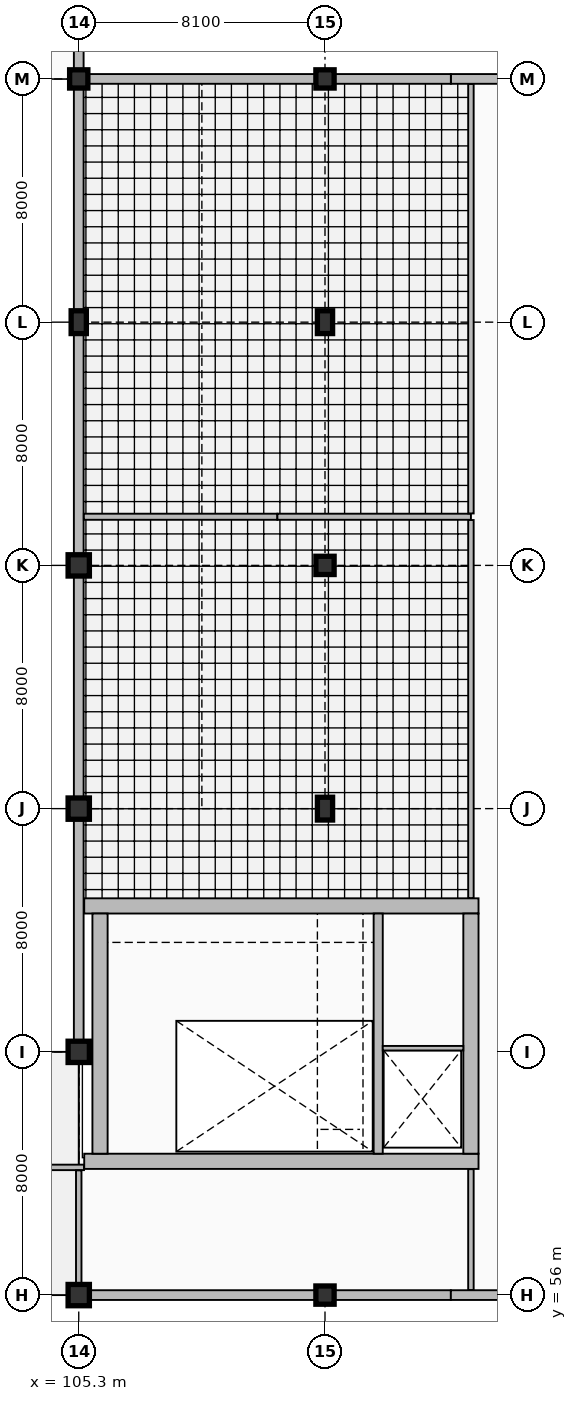
"""IFC4 building model, lengths in metres.
Left out: names, types, materials, properties, quantities, classifications, styles, units other than length and angle.
Written with IfcOpenShell. Run it as: python <this file> out.ifc"""

import sys

from ifc_helpers import new_model, si_unit, direction, frame, frame_2d, origin, origin_2d, place, context, subcontext, project, spatial, rectangle, extrude, element, fill, save


model = new_model("IFC4")
c1 = context("Model", 3, precision=1e-05, world=origin(), true_north=direction((0.0, 1.0)))
c2 = subcontext(c1, "Body", "Model", "MODEL_VIEW")
j1 = project(units=[si_unit("LENGTHUNIT", "METRE"), si_unit("PLANEANGLEUNIT", "RADIAN")], contexts=[c1])
p1 = place(None, origin())
s1 = spatial("IfcSite", under=j1, at=p1, CompositionType="ELEMENT")
p2 = place(p1, origin())
s2 = spatial("IfcBuilding", under=s1, at=p2, CompositionType="ELEMENT")
p3 = place(p2, frame((0.0, 0.0, 10.2)))
s3 = spatial("IfcBuildingStorey", under=s2, at=p3, CompositionType="ELEMENT", Elevation=10.2)
p4 = place(p3, frame((105.48, 60.4, 0.0), z_axis=(0.0, 0.0, 1.0), x_axis=(1.0, 0.0, 0.0)))
e1 = element("IfcWall", 1, at=p4, inside=s3, PredefinedType="SHEAR", context=c2, shape_type="SweptSolid", body=[
    extrude(rectangle(XDim=12.97, YDim=0.5, at=frame_2d((6.485, 0.0))), origin(), (0.0, 0.0, 1.0), 4.5),
])
p5 = place(p4, frame((1.27, 0.0, 0.0)))
e2 = element("IfcOpeningElement", 2, at=p5, cuts=e1, PredefinedType="OPENING", context=c2, shape_type="SweptSolid", body=[
    extrude(rectangle(XDim=1.15, YDim=2.25, at=frame_2d((0.575, 1.125))), frame((0.0, 0.26, 0.0), z_axis=(0.0, -1.0, 0.0), x_axis=(1.0, 0.0, 0.0)), (0.0, 0.0, 1.0), 0.52),
])
p6 = place(p4, frame((10.475, 0.0, 0.0)))
e3 = element("IfcOpeningElement", 3, at=p6, cuts=e1, PredefinedType="OPENING", context=c2, shape_type="SweptSolid", body=[
    extrude(rectangle(XDim=1.3, YDim=2.3, at=frame_2d((0.65, 1.15))), frame((0.0, 0.26, 0.0), z_axis=(0.0, -1.0, 0.0), x_axis=(1.0, 0.0, 0.0)), (0.0, 0.0, 1.0), 0.52),
])
p7 = place(p3, frame((105.48, 68.8, 0.0), z_axis=(0.0, 0.0, 1.0), x_axis=(1.0, 0.0, 0.0)))
e4 = element("IfcWall", 4, at=p7, inside=s3, PredefinedType="SHEAR", context=c2, shape_type="SweptSolid", body=[
    extrude(rectangle(XDim=12.97, YDim=0.5, at=frame_2d((6.485, 0.0))), origin(), (0.0, 0.0, 1.0), 4.5),
])
for number, where, z_axis, x_axis in (
    (5, (106.0, 60.65, 0.0), (0.0, 0.0, 1.0), (0.0, 1.0, 0.0)),
    (6, (118.2, 60.65, 0.0), (0.0, 0.0, 1.0), (0.0, 1.0, 0.0)),
):
    element("IfcWall", number, at=place(p3, frame(where, z_axis=z_axis, x_axis=x_axis)), inside=s3, PredefinedType="SHEAR", context=c2, shape_type="SweptSolid", body=[
        extrude(rectangle(XDim=7.9, YDim=0.5, at=frame_2d((3.95, 0.0))), origin(), (0.0, 0.0, 1.0), 4.5),
    ])
p8 = place(p3, frame((115.15, 60.65, 0.0), z_axis=(0.0, 0.0, 1.0), x_axis=(0.0, 1.0, 0.0)))
e7 = element("IfcWall", 7, at=p8, inside=s3, PredefinedType="SHEAR", context=c2, shape_type="SweptSolid", body=[
    extrude(rectangle(XDim=7.9, YDim=0.3, at=frame_2d((3.95, 0.0))), origin(), (0.0, 0.0, 1.0), 4.5),
])
for number, where, z_axis, x_axis in (
    (8, (105.3, 56.0, 0.0), (0.0, 0.0, 1.0), (1.0, 0.0, 0.0)),
    (9, (105.3, 64.0, 0.0), (0.0, 0.0, 1.0), (1.0, 0.0, 0.0)),
    (10, (105.3, 72.0, 0.0), (0.0, 0.0, 1.0), (1.0, 0.0, 0.0)),
    (11, (105.3, 80.0, 0.0), (0.0, 0.0, 1.0), (1.0, 0.0, 0.0)),
):
    element("IfcColumn", number, at=place(p3, frame(where, z_axis=z_axis, x_axis=x_axis)), inside=s3, PredefinedType="COLUMN", context=c2, shape_type="SweptSolid", body=[
        extrude(rectangle(XDim=0.7, YDim=0.7, at=origin_2d()), origin(), (0.0, 0.0, 1.0), 4.5),
    ])
p9 = place(p3, frame((105.3, 88.0, 0.0), z_axis=(0.0, 0.0, 1.0), x_axis=(1.0, 0.0, 0.0)))
e12 = element("IfcColumn", 12, at=p9, inside=s3, PredefinedType="COLUMN", context=c2, shape_type="SweptSolid", body=[
    extrude(rectangle(XDim=0.5, YDim=0.75, at=origin_2d()), origin(), (0.0, 0.0, 1.0), 4.5),
])
for number, where, z_axis, x_axis in (
    (13, (105.3, 96.0, 0.0), (0.0, 0.0, 1.0), (1.0, 0.0, 0.0)),
    (14, (113.4, 56.0, 0.0), (0.0, 0.0, 1.0), (1.0, 0.0, 0.0)),
):
    element("IfcColumn", number, at=place(p3, frame(where, z_axis=z_axis, x_axis=x_axis)), inside=s3, PredefinedType="COLUMN", context=c2, shape_type="SweptSolid", body=[
        extrude(rectangle(XDim=0.6, YDim=0.6, at=origin_2d()), origin(), (0.0, 0.0, 1.0), 4.5),
    ])
p10 = place(p3, frame((113.4, 72.0, 0.0), z_axis=(0.0, 0.0, 1.0), x_axis=(1.0, 0.0, 0.0)))
e15 = element("IfcColumn", 15, at=p10, inside=s3, PredefinedType="COLUMN", context=c2, shape_type="SweptSolid", body=[
    extrude(rectangle(XDim=0.5, YDim=0.75, at=origin_2d()), origin(), (0.0, 0.0, 1.0), 4.5),
])
p11 = place(p3, frame((113.4, 80.0, 0.0), z_axis=(0.0, 0.0, 1.0), x_axis=(1.0, 0.0, 0.0)))
e16 = element("IfcColumn", 16, at=p11, inside=s3, PredefinedType="COLUMN", context=c2, shape_type="SweptSolid", body=[
    extrude(rectangle(XDim=0.6, YDim=0.6, at=origin_2d()), origin(), (0.0, 0.0, 1.0), 4.5),
])
p12 = place(p3, frame((113.4, 88.0, 0.0), z_axis=(0.0, 0.0, 1.0), x_axis=(1.0, 0.0, 0.0)))
e17 = element("IfcColumn", 17, at=p12, inside=s3, PredefinedType="COLUMN", context=c2, shape_type="SweptSolid", body=[
    extrude(rectangle(XDim=0.5, YDim=0.75, at=origin_2d()), origin(), (0.0, 0.0, 1.0), 4.5),
])
p13 = place(p3, frame((113.4, 96.0, 0.0), z_axis=(0.0, 0.0, 1.0), x_axis=(1.0, 0.0, 0.0)))
e18 = element("IfcColumn", 18, at=p13, inside=s3, PredefinedType="COLUMN", context=c2, shape_type="SweptSolid", body=[
    extrude(rectangle(XDim=0.6, YDim=0.6, at=origin_2d()), origin(), (0.0, 0.0, 1.0), 4.5),
])
p14 = place(p3, frame((105.48, 56.0, 0.0), z_axis=(0.0, 0.0, 1.0), x_axis=(1.0, 0.0, 0.0)))
e19 = element("IfcWall", 19, at=p14, inside=s3, PredefinedType="SOLIDWALL", context=c2, shape_type="SweptSolid", body=[
    extrude(rectangle(XDim=12.06, YDim=0.32, at=frame_2d((6.03, 0.0))), origin(), (0.0, 0.0, 1.0), 3.544),
])
p15 = place(p14, frame((2.25, 0.0, 0.95)))
e20 = element("IfcOpeningElement", 20, at=p15, cuts=e19, PredefinedType="OPENING", context=c2, shape_type="SweptSolid", body=[
    extrude(rectangle(XDim=3.6, YDim=1.8, at=frame_2d((1.8, 0.9))), frame((0.0, 0.17, 0.0), z_axis=(0.0, -1.0, 0.0), x_axis=(1.0, 0.0, 0.0)), (0.0, 0.0, 1.0), 0.34),
])
p16 = place(p3, frame((117.54, 56.0, 0.0), z_axis=(0.0, 0.0, 1.0), x_axis=(1.0, 0.0, 0.0)))
e21 = element("IfcWall", 21, at=p16, inside=s3, PredefinedType="SOLIDWALL", context=c2, shape_type="SweptSolid", body=[
    extrude(rectangle(XDim=12.06, YDim=0.32, at=frame_2d((6.03, 0.0))), origin(), (0.0, 0.0, 1.0), 3.544),
])
p17 = place(p16, frame((3.6, 0.0, 0.95)))
e22 = element("IfcOpeningElement", 22, at=p17, cuts=e21, PredefinedType="OPENING", context=c2, shape_type="SweptSolid", body=[
    extrude(rectangle(XDim=0.6, YDim=1.8, at=frame_2d((0.3, 0.9))), frame((0.0, 0.17, 0.0), z_axis=(0.0, -1.0, 0.0), x_axis=(1.0, 0.0, 0.0)), (0.0, 0.0, 1.0), 0.34),
])
p18 = place(p3, frame((129.6, 96.0, 0.0), z_axis=(0.0, 0.0, 1.0), x_axis=(-1.0, 0.0, 0.0)))
e23 = element("IfcWall", 23, at=p18, inside=s3, PredefinedType="SOLIDWALL", context=c2, shape_type="SweptSolid", body=[
    extrude(rectangle(XDim=12.06, YDim=0.32, at=frame_2d((6.03, 0.0))), origin(), (0.0, 0.0, 1.0), 3.544),
])
p19 = place(p3, frame((117.54, 96.0, 0.0), z_axis=(0.0, 0.0, 1.0), x_axis=(-1.0, 0.0, 0.0)))
e24 = element("IfcWall", 24, at=p19, inside=s3, PredefinedType="SOLIDWALL", context=c2, shape_type="SweptSolid", body=[
    extrude(rectangle(XDim=12.06, YDim=0.32, at=frame_2d((6.03, 0.0))), origin(), (0.0, 0.0, 1.0), 3.544),
])
p20 = place(p19, frame((6.3, 0.0, 0.95)))
e25 = element("IfcOpeningElement", 25, at=p20, cuts=e24, PredefinedType="OPENING", context=c2, shape_type="SweptSolid", body=[
    extrude(rectangle(XDim=3.6, YDim=0.9, at=frame_2d((1.8, 0.45))), frame((0.0, 0.17, 0.0), z_axis=(0.0, -1.0, 0.0), x_axis=(1.0, 0.0, 0.0)), (0.0, 0.0, 1.0), 0.34),
])
p21 = place(p3, frame((105.3, 96.18, 0.0), z_axis=(0.0, 0.0, 1.0), x_axis=(0.0, 1.0, 0.0)))
e26 = element("IfcWall", 26, at=p21, inside=s3, PredefinedType="SOLIDWALL", context=c2, shape_type="SweptSolid", body=[
    extrude(rectangle(XDim=15.82, YDim=0.32, at=frame_2d((7.91, 0.0))), origin(), (0.0, 0.0, 1.0), 3.732),
])
p22 = place(p21, frame((9.45, 0.0, 0.95)))
e27 = element("IfcOpeningElement", 27, at=p22, cuts=e26, PredefinedType="OPENING", context=c2, shape_type="SweptSolid", body=[
    extrude(rectangle(XDim=1.6, YDim=1.4, at=frame_2d((0.8, 0.7))), frame((0.0, 0.17, 0.0), z_axis=(0.0, -1.0, 0.0), x_axis=(1.0, 0.0, 0.0)), (0.0, 0.0, 1.0), 0.34),
])
p23 = place(p3, frame((105.3, 95.82, 0.0), z_axis=(0.0, 0.0, 1.0), x_axis=(0.0, -1.0, 0.0)))
e28 = element("IfcWall", 28, at=p23, inside=s3, PredefinedType="SOLIDWALL", context=c2, shape_type="SweptSolid", body=[
    extrude(rectangle(XDim=15.82, YDim=0.32, at=frame_2d((7.91, 0.0))), origin(), (0.0, 0.0, 1.0), 3.769),
])
p24 = place(p3, frame((105.3, 80.0, 0.0), z_axis=(0.0, 0.0, 1.0), x_axis=(0.0, -1.0, 0.0)))
e29 = element("IfcWall", 29, at=p24, inside=s3, PredefinedType="SOLIDWALL", context=c2, shape_type="SweptSolid", body=[
    extrude(rectangle(XDim=15.82, YDim=0.32, at=frame_2d((7.91, 0.0))), origin(), (0.0, 0.0, 1.0), 3.732),
])
p25 = place(p24, frame((4.05, 0.0, 0.95)))
e30 = element("IfcOpeningElement", 30, at=p25, cuts=e29, PredefinedType="OPENING", context=c2, shape_type="SweptSolid", body=[
    extrude(rectangle(XDim=2.7, YDim=1.8, at=frame_2d((1.35, 0.9))), frame((0.0, 0.17, 0.0), z_axis=(0.0, -1.0, 0.0), x_axis=(1.0, 0.0, 0.0)), (0.0, 0.0, 1.0), 0.34),
])
p26 = place(p3, frame((115.3, 64.12, 0.0), z_axis=(0.0, 0.0, 1.0), x_axis=(1.0, 0.0, 0.0)))
e31 = element("IfcWall", 31, at=p26, inside=s3, PredefinedType="PARTITIONING", context=c2, shape_type="SweptSolid", body=[
    extrude(rectangle(XDim=2.65, YDim=0.15, at=frame_2d((1.325, 0.0))), origin(), (0.0, 0.0, 1.0), 4.24),
])
p27 = place(p3, frame((48.6, 60.2, 0.0), z_axis=(0.0, 0.0, 1.0), x_axis=(1.0, 0.0, 0.0)))
e32 = element("IfcWall", 32, at=p27, inside=s3, PredefinedType="PARTITIONING", context=c2, shape_type="SweptSolid", body=[
    extrude(rectangle(XDim=56.872, YDim=0.18, at=frame_2d((28.436, 0.0))), origin(), (0.0, 0.0, 1.0), 4.24),
])
p28 = place(p27, frame((27.886, 0.0, 0.0)))
e33 = element("IfcOpeningElement", 33, at=p28, cuts=e32, PredefinedType="OPENING", context=c2, shape_type="SweptSolid", body=[
    extrude(rectangle(XDim=1.1, YDim=2.2, at=frame_2d((0.55, 1.1))), frame((0.0, 0.1, 0.0), z_axis=(0.0, -1.0, 0.0), x_axis=(1.0, 0.0, 0.0)), (0.0, 0.0, 1.0), 0.2),
])
for number, where, z_axis, x_axis in (
    (34, (105.468, 81.6, 0.0), (0.0, 0.0, 1.0), (1.0, 0.0, 0.0)),
    (35, (111.834, 81.6, 0.0), (0.0, 0.0, 1.0), (1.0, 0.0, 0.0)),
):
    element("IfcWall", number, at=place(p3, frame(where, z_axis=z_axis, x_axis=x_axis)), inside=s3, PredefinedType="PARTITIONING", context=c2, shape_type="SweptSolid", body=[
        extrude(rectangle(XDim=6.366, YDim=0.2, at=frame_2d((3.183, 0.0))), origin(), (0.0, 0.0, 1.0), 4.24),
    ])
p29 = place(p3, frame((105.3, 56.358, 0.0), z_axis=(0.0, 0.0, 1.0), x_axis=(0.0, 1.0, 0.0)))
e36 = element("IfcWall", 36, at=p29, inside=s3, PredefinedType="PARTITIONING", context=c2, shape_type="SweptSolid", body=[
    extrude(rectangle(XDim=3.744, YDim=0.18, at=frame_2d((1.872, 0.0))), origin(), (0.0, 0.0, 1.0), 3.769),
])
p30 = place(p29, frame((1.372, 0.0, 0.0)))
e37 = element("IfcOpeningElement", 37, at=p30, cuts=e36, PredefinedType="OPENING", context=c2, shape_type="SweptSolid", body=[
    extrude(rectangle(XDim=1.6, YDim=2.35, at=frame_2d((0.8, 1.175))), frame((0.0, 0.1, 0.0), z_axis=(0.0, -1.0, 0.0), x_axis=(1.0, 0.0, 0.0)), (0.0, 0.0, 1.0), 0.2),
])
p31 = place(p3, frame((118.2, 56.168, 0.0), z_axis=(0.0, 0.0, 1.0), x_axis=(0.0, 1.0, 0.0)))
e38 = element("IfcWall", 38, at=p31, inside=s3, PredefinedType="PARTITIONING", context=c2, shape_type="SweptSolid", body=[
    extrude(rectangle(XDim=3.974, YDim=0.18, at=frame_2d((1.987, 0.0))), origin(), (0.0, 0.0, 1.0), 4.24),
])
p32 = place(p31, frame((1.387, 0.0, 0.0)))
e39 = element("IfcOpeningElement", 39, at=p32, cuts=e38, PredefinedType="OPENING", context=c2, shape_type="SweptSolid", body=[
    extrude(rectangle(XDim=1.2, YDim=2.2, at=frame_2d((0.6, 1.1))), frame((0.0, 0.1, 0.0), z_axis=(0.0, -1.0, 0.0), x_axis=(1.0, 0.0, 0.0)), (0.0, 0.0, 1.0), 0.2),
])
p33 = place(p3, frame((118.2, 69.058, 0.0), z_axis=(0.0, 0.0, 1.0), x_axis=(0.0, 1.0, 0.0)))
e40 = element("IfcWall", 40, at=p33, inside=s3, PredefinedType="PARTITIONING", context=c2, shape_type="SweptSolid", body=[
    extrude(rectangle(XDim=12.434, YDim=0.18, at=frame_2d((6.217, 0.0))), origin(), (0.0, 0.0, 1.0), 4.24),
])
p34 = place(p33, frame((5.667, 0.0, 0.0)))
e41 = element("IfcOpeningElement", 41, at=p34, cuts=e40, PredefinedType="OPENING", context=c2, shape_type="SweptSolid", body=[
    extrude(rectangle(XDim=1.1, YDim=2.2, at=frame_2d((0.55, 1.1))), frame((0.0, 0.1, 0.0), z_axis=(0.0, -1.0, 0.0), x_axis=(1.0, 0.0, 0.0)), (0.0, 0.0, 1.0), 0.2),
])
p35 = place(p3, frame((118.2, 81.708, 0.0), z_axis=(0.0, 0.0, 1.0), x_axis=(0.0, 1.0, 0.0)))
e42 = element("IfcWall", 42, at=p35, inside=s3, PredefinedType="PARTITIONING", context=c2, shape_type="SweptSolid", body=[
    extrude(rectangle(XDim=14.124, YDim=0.18, at=frame_2d((7.062, 0.0))), origin(), (0.0, 0.0, 1.0), 4.24),
])
p36 = place(p35, frame((6.512, 0.0, 0.0)))
e43 = element("IfcOpeningElement", 43, at=p36, cuts=e42, PredefinedType="OPENING", context=c2, shape_type="SweptSolid", body=[
    extrude(rectangle(XDim=1.1, YDim=2.2, at=frame_2d((0.55, 1.1))), frame((0.0, 0.1, 0.0), z_axis=(0.0, -1.0, 0.0), x_axis=(1.0, 0.0, 0.0)), (0.0, 0.0, 1.0), 0.2),
])
p37 = place(p15, origin())
e44 = element("IfcWindow", 44, at=p37, inside=s3, PartitioningType="TRIPLE_PANEL_VERTICAL", PredefinedType="WINDOW", context=c2, shape_type="SweptSolid", body=[
    extrude(rectangle(XDim=3.6, YDim=1.8, at=frame_2d((1.8, 0.9))), frame((0.0, 0.03, 0.0), z_axis=(0.0, -1.0, 0.0), x_axis=(1.0, 0.0, 0.0)), (0.0, 0.0, 1.0), 0.06),
])
fill(e20, e44)
p38 = place(p20, origin())
e45 = element("IfcWindow", 45, at=p38, inside=s3, PartitioningType="TRIPLE_PANEL_VERTICAL", PredefinedType="WINDOW", context=c2, shape_type="SweptSolid", body=[
    extrude(rectangle(XDim=3.6, YDim=0.9, at=frame_2d((1.8, 0.45))), frame((0.0, 0.03, 0.0), z_axis=(0.0, -1.0, 0.0), x_axis=(1.0, 0.0, 0.0)), (0.0, 0.0, 1.0), 0.06),
])
fill(e25, e45)
p39 = place(p25, origin())
e46 = element("IfcWindow", 46, at=p39, inside=s3, PartitioningType="TRIPLE_PANEL_VERTICAL", PredefinedType="WINDOW", context=c2, shape_type="SweptSolid", body=[
    extrude(rectangle(XDim=2.7, YDim=1.8, at=frame_2d((1.35, 0.9))), frame((0.0, 0.03, 0.0), z_axis=(0.0, -1.0, 0.0), x_axis=(1.0, 0.0, 0.0)), (0.0, 0.0, 1.0), 0.06),
])
fill(e30, e46)
p40 = place(p5, origin())
e47 = element("IfcDoor", 47, at=p40, inside=s3, OperationType="SINGLE_SWING_RIGHT", PredefinedType="DOOR", context=c2, shape_type="SweptSolid", body=[
    extrude(rectangle(XDim=1.15, YDim=2.25, at=frame_2d((0.575, 1.125))), frame((0.0, 0.025, 0.0), z_axis=(0.0, -1.0, 0.0), x_axis=(1.0, 0.0, 0.0)), (0.0, 0.0, 1.0), 0.05),
])
fill(e2, e47)
p41 = place(p6, frame((1.3, 0.0, 0.0), z_axis=(0.0, 0.0, 1.0), x_axis=(-1.0, 0.0, 0.0)))
e48 = element("IfcDoor", 48, at=p41, inside=s3, OperationType="DOUBLE_DOOR_SLIDING", PredefinedType="DOOR", context=c2, shape_type="SweptSolid", body=[
    extrude(rectangle(XDim=1.3, YDim=2.3, at=frame_2d((0.65, 1.15))), frame((0.0, 0.025, 0.0), z_axis=(0.0, -1.0, 0.0), x_axis=(1.0, 0.0, 0.0)), (0.0, 0.0, 1.0), 0.05),
])
fill(e3, e48)
p42 = place(p30, origin())
e49 = element("IfcDoor", 49, at=p42, inside=s3, OperationType="DOUBLE_DOOR_SINGLE_SWING", PredefinedType="DOOR", context=c2, shape_type="SweptSolid", body=[
    extrude(rectangle(XDim=1.6, YDim=2.35, at=frame_2d((0.8, 1.175))), frame((0.0, 0.025, 0.0), z_axis=(0.0, -1.0, 0.0), x_axis=(1.0, 0.0, 0.0)), (0.0, 0.0, 1.0), 0.05),
])
fill(e37, e49)
p43 = place(p32, frame((1.2, 0.0, 0.0), z_axis=(0.0, 0.0, 1.0), x_axis=(-1.0, 0.0, 0.0)))
e50 = element("IfcDoor", 50, at=p43, inside=s3, OperationType="SINGLE_SWING_LEFT", PredefinedType="DOOR", context=c2, shape_type="SweptSolid", body=[
    extrude(rectangle(XDim=1.2, YDim=2.2, at=frame_2d((0.6, 1.1))), frame((0.0, 0.025, 0.0), z_axis=(0.0, -1.0, 0.0), x_axis=(1.0, 0.0, 0.0)), (0.0, 0.0, 1.0), 0.05),
])
fill(e39, e50)
p44 = place(p34, origin())
e51 = element("IfcDoor", 51, at=p44, inside=s3, OperationType="SINGLE_SWING_RIGHT", PredefinedType="DOOR", context=c2, shape_type="SweptSolid", body=[
    extrude(rectangle(XDim=1.1, YDim=2.2, at=frame_2d((0.55, 1.1))), frame((0.0, 0.025, 0.0), z_axis=(0.0, -1.0, 0.0), x_axis=(1.0, 0.0, 0.0)), (0.0, 0.0, 1.0), 0.05),
])
fill(e41, e51)
p45 = place(p36, origin())
e52 = element("IfcDoor", 52, at=p45, inside=s3, OperationType="SINGLE_SWING_LEFT", PredefinedType="DOOR", context=c2, shape_type="SweptSolid", body=[
    extrude(rectangle(XDim=1.1, YDim=2.2, at=frame_2d((0.55, 1.1))), frame((0.0, 0.025, 0.0), z_axis=(0.0, -1.0, 0.0), x_axis=(1.0, 0.0, 0.0)), (0.0, 0.0, 1.0), 0.05),
])
fill(e43, e52)
save(model, sys.argv[1])
